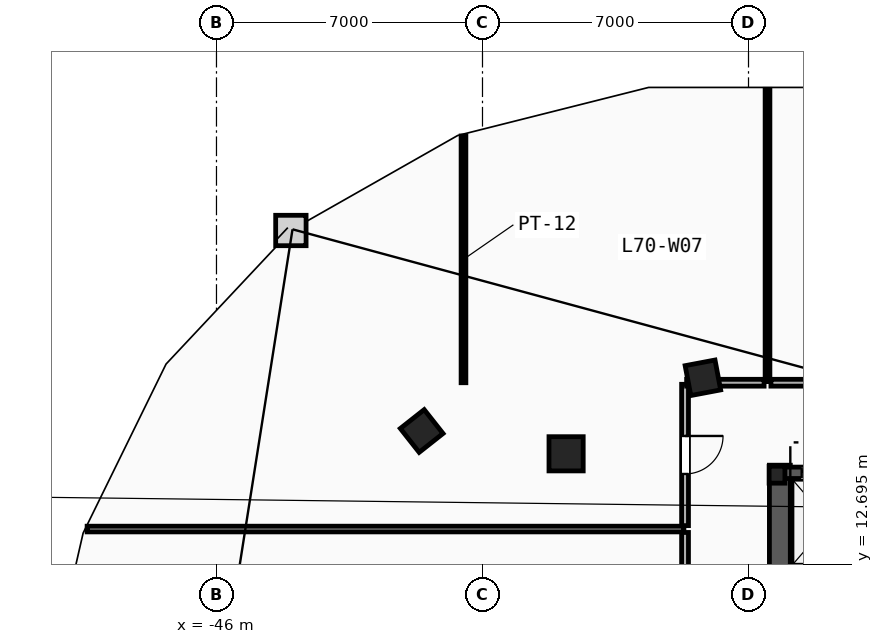
"""IFC4 building model, lengths in metres.
Left out: names, types, materials, properties, quantities, classifications, styles, units other than length and angle.
Written with IfcOpenShell. Run it as: python <this file> out.ifc"""

import sys

from ifc_helpers import new_model, si_unit, direction, frame, frame_2d, origin, origin_2d, place, context, subcontext, project, spatial, rectangle, i_section, extrude, element, fill, save


model = new_model("IFC4")
c1 = context("Model", 3, precision=1e-05, world=origin(), true_north=direction((0.0, 1.0)))
c2 = subcontext(c1, "Body", "Model", "MODEL_VIEW")
j1 = project(units=[si_unit("LENGTHUNIT", "METRE"), si_unit("PLANEANGLEUNIT", "RADIAN")], contexts=[c1])
p1 = place(None, origin())
s1 = spatial("IfcSite", under=j1, at=p1, CompositionType="ELEMENT")
p2 = place(p1, origin())
s2 = spatial("IfcBuilding", under=s1, at=p2, CompositionType="ELEMENT")
p3 = place(p2, frame((0.0, 0.0, 264.8)))
s3 = spatial("IfcBuildingStorey", under=s2, at=p3, CompositionType="ELEMENT", Elevation=264.8)
p4 = place(p3, frame((-31.25, 15.05, 0.0), z_axis=(0.0, 0.0, 1.0), x_axis=(1.0, 0.0, 0.0)))
e1 = element("IfcColumn", 1, at=p4, inside=s3, PredefinedType="COLUMN", context=c2, shape_type="SweptSolid", body=[
    extrude(i_section(OverallWidth=0.416, OverallDepth=0.446, WebThickness=0.039, FlangeThickness=0.063, FilletRadius=0.018, at=origin_2d()), origin(), (0.0, 0.0, 1.0), 3.6),
])
p5 = place(p3, frame((-36.8, 15.6, 0.0), z_axis=(0.0, 0.0, 1.0), x_axis=(1.0, 0.0, 0.0)))
e2 = element("IfcColumn", 2, at=p5, inside=s3, PredefinedType="COLUMN", context=c2, shape_type="SweptSolid", body=[
    extrude(rectangle(XDim=0.9, YDim=0.9, at=origin_2d()), origin(), (0.0, 0.0, 1.0), 3.6),
])
for number, where, z_axis, x_axis in (
    (3, (-33.2, 17.6, 0.0), (0.0, 0.0, 1.0), (-0.983, -0.186, 0.0)),
    (4, (-40.6, 16.2, 0.0), (0.0, 0.0, 1.0), (-0.785, -0.619, 0.0)),
):
    element("IfcColumn", number, at=place(p3, frame(where, z_axis=z_axis, x_axis=x_axis)), inside=s3, PredefinedType="COLUMN", context=c2, shape_type="SweptSolid", body=[
        extrude(rectangle(XDim=0.8, YDim=0.8, at=origin_2d()), origin(), (0.0, 0.0, 1.0), 3.6),
    ])
p6 = place(p3, frame((-31.175, 1.97, 0.0), z_axis=(0.0, 0.0, 1.0), x_axis=(0.0, 1.0, 0.0)))
e5 = element("IfcWall", 5, at=p6, inside=s3, PredefinedType="SHEAR", context=c2, shape_type="SweptSolid", body=[
    extrude(rectangle(XDim=13.33, YDim=0.55, at=frame_2d((6.665, 0.0))), origin(), (0.0, 0.0, 1.0), 3.34),
])
p7 = place(p3, frame((-31.2, 15.1, 0.0), z_axis=(0.0, 0.0, 1.0), x_axis=(1.0, 0.0, 0.0)))
e6 = element("IfcWall", 6, at=p7, inside=s3, PredefinedType="SHEAR", context=c2, shape_type="SweptSolid", body=[
    extrude(rectangle(XDim=2.5, YDim=0.3, at=frame_2d((1.25, 0.0))), origin(), (0.0, 0.0, 1.0), 3.34),
])
p8 = place(p7, frame((0.6, 0.0, 0.0)))
e7 = element("IfcOpeningElement", 7, at=p8, cuts=e6, PredefinedType="OPENING", context=c2, shape_type="SweptSolid", body=[
    extrude(rectangle(XDim=1.3, YDim=2.2, at=frame_2d((0.65, 1.1))), frame((0.0, 0.16, 0.0), z_axis=(0.0, -1.0, 0.0), x_axis=(1.0, 0.0, 0.0)), (0.0, 0.0, 1.0), 0.32),
])
p9 = place(p3, frame((-49.404, 13.62, 0.0), z_axis=(0.0, 0.0, 1.0), x_axis=(1.0, 0.0, 0.0)))
e8 = element("IfcWall", 8, at=p9, inside=s3, PredefinedType="PARTITIONING", context=c2, shape_type="SweptSolid", body=[
    extrude(rectangle(XDim=15.704, YDim=0.15, at=frame_2d((7.852, 0.0))), origin(), (0.0, 0.0, 1.0), 3.34),
])
p10 = place(p3, frame((-39.5, 17.47, 0.0), z_axis=(0.0, 0.0, 1.0), x_axis=(0.0, 1.0, 0.0)))
e9 = element("IfcWall", 9, at=p10, inside=s3, PredefinedType="PARTITIONING", context=c2, shape_type="SweptSolid", body=[
    extrude(rectangle(XDim=6.493, YDim=0.125, at=frame_2d((3.246, 0.0))), origin(), (0.0, 0.0, 1.0), 3.34),
])
p11 = place(p3, frame((-31.5, 17.5, 0.0), z_axis=(0.0, 0.0, 1.0), x_axis=(0.0, 1.0, 0.0)))
e10 = element("IfcWall", 10, at=p11, inside=s3, PredefinedType="PARTITIONING", context=c2, shape_type="SweptSolid", body=[
    extrude(rectangle(XDim=7.69, YDim=0.125, at=frame_2d((3.845, 0.0))), origin(), (0.0, 0.0, 1.0), 3.34),
])
p12 = place(p3, frame((-33.67, 13.53, 0.0), z_axis=(0.0, 0.0, 1.0), x_axis=(0.0, -1.0, 0.0)))
e11 = element("IfcWall", 11, at=p12, inside=s3, PredefinedType="PARTITIONING", context=c2, shape_type="SweptSolid", body=[
    extrude(rectangle(XDim=4.179, YDim=0.18, at=frame_2d((2.089, 0.0))), origin(), (0.0, 0.0, 1.0), 3.34),
])
p13 = place(p12, frame((1.589, 0.0, 0.0)))
e12 = element("IfcOpeningElement", 12, at=p13, cuts=e11, PredefinedType="OPENING", context=c2, shape_type="SweptSolid", body=[
    extrude(rectangle(XDim=1.0, YDim=2.15, at=frame_2d((0.5, 1.075))), frame((0.0, 0.1, 0.0), z_axis=(0.0, -1.0, 0.0), x_axis=(1.0, 0.0, 0.0)), (0.0, 0.0, 1.0), 0.2),
])
p14 = place(p3, frame((-33.67, 17.428, 0.0), z_axis=(0.0, 0.0, 1.0), x_axis=(0.0, -1.0, 0.0)))
e13 = element("IfcWall", 13, at=p14, inside=s3, PredefinedType="PARTITIONING", context=c2, shape_type="SweptSolid", body=[
    extrude(rectangle(XDim=3.719, YDim=0.18, at=frame_2d((1.859, 0.0))), origin(), (0.0, 0.0, 1.0), 3.34),
])
p15 = place(p14, frame((1.359, 0.0, 0.0)))
e14 = element("IfcOpeningElement", 14, at=p15, cuts=e13, PredefinedType="OPENING", context=c2, shape_type="SweptSolid", body=[
    extrude(rectangle(XDim=1.0, YDim=2.15, at=frame_2d((0.5, 1.075))), frame((0.0, 0.1, 0.0), z_axis=(0.0, -1.0, 0.0), x_axis=(1.0, 0.0, 0.0)), (0.0, 0.0, 1.0), 0.2),
])
p16 = place(p3, frame((-31.59, 17.47, 0.0), z_axis=(0.0, 0.0, 1.0), x_axis=(-1.0, 0.0, 0.0)))
e15 = element("IfcWall", 15, at=p16, inside=s3, PredefinedType="PARTITIONING", context=c2, shape_type="SweptSolid", body=[
    extrude(rectangle(XDim=2.038, YDim=0.18, at=frame_2d((1.019, 0.0))), origin(), (0.0, 0.0, 1.0), 3.34),
])
p17 = place(p3, frame((-24.59, 17.47, 0.0), z_axis=(0.0, 0.0, 1.0), x_axis=(-1.0, 0.0, 0.0)))
e16 = element("IfcWall", 16, at=p17, inside=s3, PredefinedType="PARTITIONING", context=c2, shape_type="SweptSolid", body=[
    extrude(rectangle(XDim=6.82, YDim=0.18, at=frame_2d((3.41, 0.0))), origin(), (0.0, 0.0, 1.0), 3.34),
])
p18 = place(p17, frame((2.91, 0.0, 0.0)))
e17 = element("IfcOpeningElement", 17, at=p18, cuts=e16, PredefinedType="OPENING", context=c2, shape_type="SweptSolid", body=[
    extrude(rectangle(XDim=1.0, YDim=2.15, at=frame_2d((0.5, 1.075))), frame((0.0, 0.1, 0.0), z_axis=(0.0, -1.0, 0.0), x_axis=(1.0, 0.0, 0.0)), (0.0, 0.0, 1.0), 0.2),
])
p19 = place(p8, origin())
e18 = element("IfcDoor", 18, at=p19, inside=s3, OperationType="SLIDING_TO_LEFT", PredefinedType="TRAPDOOR", context=c2, shape_type="SweptSolid", body=[
    extrude(rectangle(XDim=1.3, YDim=2.2, at=frame_2d((0.65, 1.1))), frame((0.0, 0.025, 0.0), z_axis=(0.0, -1.0, 0.0), x_axis=(1.0, 0.0, 0.0)), (0.0, 0.0, 1.0), 0.05),
])
fill(e7, e18)
p20 = place(p15, origin())
e19 = element("IfcDoor", 19, at=p20, inside=s3, OperationType="SINGLE_SWING_LEFT", PredefinedType="DOOR", context=c2, shape_type="SweptSolid", body=[
    extrude(rectangle(XDim=1.0, YDim=2.15, at=frame_2d((0.5, 1.075))), frame((0.0, 0.025, 0.0), z_axis=(0.0, -1.0, 0.0), x_axis=(1.0, 0.0, 0.0)), (0.0, 0.0, 1.0), 0.05),
])
fill(e14, e19)
save(model, sys.argv[1])
